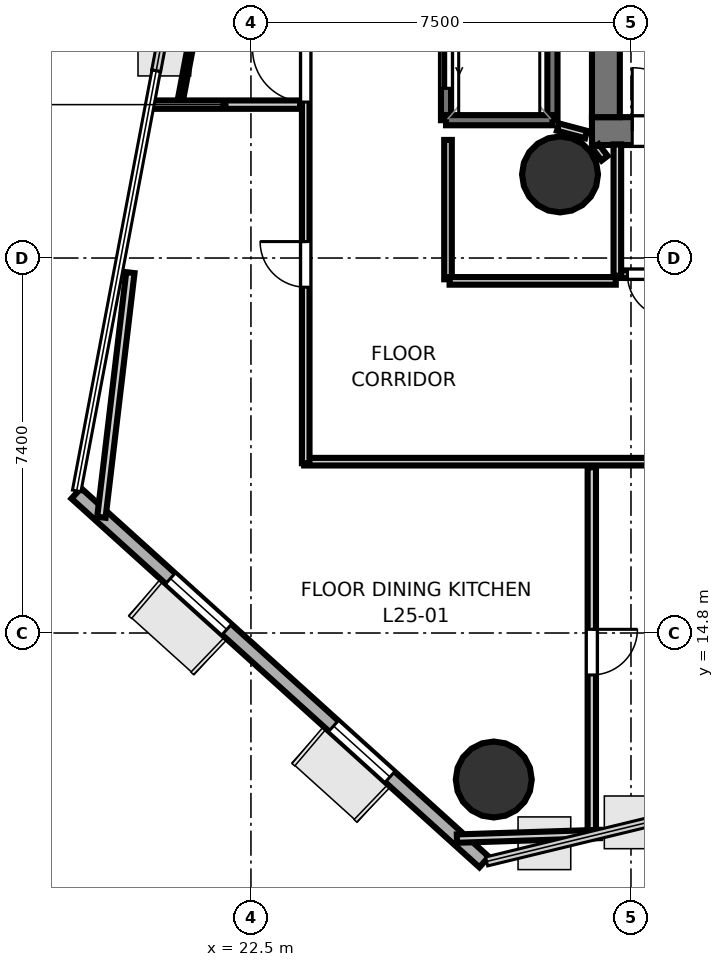
"""IFC4 building model, lengths in metres.
Left out: names, types, materials, properties, quantities, classifications, styles, units other than length and angle.
Written with IfcOpenShell. Run it as: python <this file> out.ifc"""

import sys

from ifc_helpers import new_model, si_unit, direction, frame, frame_2d, origin, origin_2d, place, context, subcontext, project, spatial, rectangle, hollow_circle, extrude, element, fill, save


model = new_model("IFC4")
c1 = context("Model", 3, precision=1e-05, world=origin(), true_north=direction((0.0, 1.0)))
c2 = subcontext(c1, "Body", "Model", "MODEL_VIEW")
j1 = project(units=[si_unit("LENGTHUNIT", "METRE"), si_unit("PLANEANGLEUNIT", "RADIAN")], contexts=[c1])
p1 = place(None, origin())
s1 = spatial("IfcSite", under=j1, at=p1, CompositionType="ELEMENT")
p2 = place(p1, origin())
s2 = spatial("IfcBuilding", under=s1, at=p2, CompositionType="ELEMENT")
p3 = place(p2, frame((0.0, 0.0, 101.5)))
s3 = spatial("IfcBuildingStorey", under=s2, at=p3, CompositionType="ELEMENT", Elevation=101.5)
p4 = place(p3, frame((29.23, 24.705, 0.0), z_axis=(0.0, 0.0, 1.0), x_axis=(1.0, 0.0, 0.0)))
e1 = element("IfcWall", 1, at=p4, inside=s3, PredefinedType="SHEAR", context=c2, shape_type="SweptSolid", body=[
    extrude(rectangle(XDim=10.62, YDim=0.55, at=frame_2d((5.31, 0.0))), origin(), (0.0, 0.0, 1.0), 3.52),
])
p5 = place(p4, frame((0.795, 0.0, 0.0)))
e2 = element("IfcOpeningElement", 2, at=p5, cuts=e1, PredefinedType="OPENING", context=c2, shape_type="SweptSolid", body=[
    extrude(rectangle(XDim=1.25, YDim=2.15, at=frame_2d((0.625, 1.075))), frame((0.0, 0.285, 0.0), z_axis=(0.0, -1.0, 0.0), x_axis=(1.0, 0.0, 0.0)), (0.0, 0.0, 1.0), 0.57),
])
p6 = place(p3, frame((29.505, 24.98, 0.0), z_axis=(0.0, 0.0, 1.0), x_axis=(0.0, 1.0, 0.0)))
e3 = element("IfcWall", 3, at=p6, inside=s3, PredefinedType="SHEAR", context=c2, shape_type="SweptSolid", body=[
    extrude(rectangle(XDim=7.44, YDim=0.55, at=frame_2d((3.72, 0.0))), origin(), (0.0, 0.0, 1.0), 3.52),
])
for number, where, z_axis, x_axis in (
    (4, (28.6, 23.85, 0.0), (0.0, 0.0, 1.0), (1.0, 0.0, 0.0)),
    (5, (27.292, 11.909, 0.0), (0.0, 0.0, 1.0), (1.0, 0.0, 0.0)),
):
    element("IfcColumn", number, at=place(p3, frame(where, z_axis=z_axis, x_axis=x_axis)), inside=s3, PredefinedType="COLUMN", context=c2, shape_type="SweptSolid", body=[
        extrude(hollow_circle(Radius=0.75, WallThickness=0.036, at=origin_2d()), origin(), (0.0, 0.0, 1.0), 3.7),
    ])
p7 = place(p3, frame((19.052, 17.556, 0.0), z_axis=(0.0, 0.0, 1.0), x_axis=(0.741888527343, -0.670523238223, 0.0)))
e6 = element("IfcWall", 6, at=p7, inside=s3, PredefinedType="SOLIDWALL", context=c2, shape_type="SweptSolid", body=[
    extrude(rectangle(XDim=10.851, YDim=0.28, at=frame_2d((5.426, 0.0))), origin(), (0.0, 0.0, 1.0), 3.52),
])
p8 = place(p7, frame((2.505, 0.0, 0.85)))
e7 = element("IfcOpeningElement", 7, at=p8, cuts=e6, PredefinedType="OPENING", context=c2, shape_type="SweptSolid", body=[
    extrude(rectangle(XDim=1.5, YDim=2.1, at=frame_2d((0.75, 1.05))), frame((0.0, 0.15, 0.0), z_axis=(0.0, -1.0, 0.0), x_axis=(1.0, 0.0, 0.0)), (0.0, 0.0, 1.0), 0.3),
])
p9 = place(p7, frame((6.846, 0.0, 0.85)))
e8 = element("IfcOpeningElement", 8, at=p9, cuts=e6, PredefinedType="OPENING", context=c2, shape_type="SweptSolid", body=[
    extrude(rectangle(XDim=1.5, YDim=2.1, at=frame_2d((0.75, 1.05))), frame((0.0, 0.15, 0.0), z_axis=(0.0, -1.0, 0.0), x_axis=(1.0, 0.0, 0.0)), (0.0, 0.0, 1.0), 0.3),
])
p10 = place(p3, frame((28.45, 24.92, 0.0), z_axis=(0.0, 0.0, 1.0), x_axis=(0.0, 1.0, 0.0)))
e9 = element("IfcWall", 9, at=p10, inside=s3, PredefinedType="SOLIDWALL", context=c2, shape_type="SweptSolid", body=[
    extrude(rectangle(XDim=2.36, YDim=0.2, at=frame_2d((1.18, 0.0))), origin(), (0.0, 0.0, 1.0), 3.52),
])
p11 = place(p3, frame((26.35, 24.92, 0.0), z_axis=(0.0, 0.0, 1.0), x_axis=(0.0, 1.0, 0.0)))
e10 = element("IfcWall", 10, at=p11, inside=s3, PredefinedType="SOLIDWALL", context=c2, shape_type="SweptSolid", body=[
    extrude(rectangle(XDim=2.36, YDim=0.2, at=frame_2d((1.18, 0.0))), origin(), (0.0, 0.0, 1.0), 3.52),
])
p12 = place(p11, frame((0.63, 0.0, 0.0)))
e11 = element("IfcOpeningElement", 11, at=p12, cuts=e10, PredefinedType="OPENING", context=c2, shape_type="SweptSolid", body=[
    extrude(rectangle(XDim=1.1, YDim=2.15, at=frame_2d((0.55, 1.075))), frame((0.0, 0.11, 0.0), z_axis=(0.0, -1.0, 0.0), x_axis=(1.0, 0.0, 0.0)), (0.0, 0.0, 1.0), 0.22),
])
p13 = place(p3, frame((26.35, 24.92, 0.0), z_axis=(0.0, 0.0, 1.0), x_axis=(1.0, 0.0, 0.0)))
e12 = element("IfcWall", 12, at=p13, inside=s3, PredefinedType="SOLIDWALL", context=c2, shape_type="SweptSolid", body=[
    extrude(rectangle(XDim=2.1, YDim=0.2, at=frame_2d((1.05, 0.0))), origin(), (0.0, 0.0, 1.0), 3.52),
])
p14 = place(p3, frame((33.45, 21.881, 0.0), z_axis=(0.0, 0.0, 1.0), x_axis=(-1.0, 0.0, 0.0)))
e13 = element("IfcWall", 13, at=p14, inside=s3, PredefinedType="PARTITIONING", context=c2, shape_type="SweptSolid", body=[
    extrude(rectangle(XDim=3.75, YDim=0.15, at=frame_2d((1.875, 0.0))), origin(), (0.0, 0.0, 1.0), 2.84),
])
p15 = place(p14, frame((1.275, 0.0, 0.0)))
e14 = element("IfcOpeningElement", 14, at=p15, cuts=e13, PredefinedType="OPENING", context=c2, shape_type="SweptSolid", body=[
    extrude(rectangle(XDim=1.2, YDim=2.15, at=frame_2d((0.6, 1.075))), frame((0.0, 0.085, 0.0), z_axis=(0.0, -1.0, 0.0), x_axis=(1.0, 0.0, 0.0)), (0.0, 0.0, 1.0), 0.17),
])
p16 = place(p14, frame((2.66, 0.0, 0.0)))
e15 = element("IfcOpeningElement", 15, at=p16, cuts=e13, PredefinedType="OPENING", context=c2, shape_type="SweptSolid", body=[
    extrude(rectangle(XDim=0.86, YDim=2.05, at=frame_2d((0.43, 1.025))), frame((0.0, 0.085, 0.0), z_axis=(0.0, -1.0, 0.0), x_axis=(1.0, 0.0, 0.0)), (0.0, 0.0, 1.0), 0.17),
])
p17 = place(p3, frame((29.731, 21.85, 0.0), z_axis=(0.0, 0.0, 1.0), x_axis=(0.0, 1.0, 0.0)))
e16 = element("IfcWall", 16, at=p17, inside=s3, PredefinedType="PARTITIONING", context=c2, shape_type="SweptSolid", body=[
    extrude(rectangle(XDim=2.592, YDim=0.15, at=frame_2d((1.296, 0.0))), origin(), (0.0, 0.0, 1.0), 2.84),
])
p18 = place(p3, frame((29.48, 24.169, 0.0), z_axis=(0.0, 0.0, 1.0), x_axis=(-0.608043045279, 0.79390405912, 0.0)))
e17 = element("IfcWall", 17, at=p18, inside=s3, PredefinedType="PARTITIONING", context=c2, shape_type="SweptSolid", body=[
    extrude(rectangle(XDim=0.29, YDim=0.15, at=frame_2d((0.145, 0.0))), origin(), (0.0, 0.0, 1.0), 2.84),
])
p19 = place(p3, frame((29.114, 24.637, 0.0), z_axis=(0.0, 0.0, 1.0), x_axis=(-0.966199685486, 0.257794817183, 0.0)))
e18 = element("IfcWall", 18, at=p19, inside=s3, PredefinedType="PARTITIONING", context=c2, shape_type="SweptSolid", body=[
    extrude(rectangle(XDim=0.575, YDim=0.15, at=frame_2d((0.288, 0.0))), origin(), (0.0, 0.0, 1.0), 2.84),
])
p20 = place(p3, frame((26.389, 24.531, 0.0), z_axis=(0.0, 0.0, 1.0), x_axis=(0.0, -1.0, 0.0)))
e19 = element("IfcWall", 19, at=p20, inside=s3, PredefinedType="PARTITIONING", context=c2, shape_type="SweptSolid", body=[
    extrude(rectangle(XDim=2.75, YDim=0.15, at=frame_2d((1.375, 0.0))), origin(), (0.0, 0.0, 1.0), 2.84),
])
p21 = place(p3, frame((26.42, 21.749, 0.0), z_axis=(0.0, 0.0, 1.0), x_axis=(1.0, 0.0, 0.0)))
e20 = element("IfcWall", 20, at=p21, inside=s3, PredefinedType="PARTITIONING", context=c2, shape_type="SweptSolid", body=[
    extrude(rectangle(XDim=3.28, YDim=0.15, at=frame_2d((1.64, 0.0))), origin(), (0.0, 0.0, 1.0), 2.84),
])
p22 = place(p3, frame((33.32, 18.181, 0.0), z_axis=(0.0, 0.0, 1.0), x_axis=(-1.0, 0.0, 0.0)))
e21 = element("IfcWall", 21, at=p22, inside=s3, PredefinedType="PARTITIONING", context=c2, shape_type="SweptSolid", body=[
    extrude(rectangle(XDim=9.77, YDim=0.15, at=frame_2d((4.885, 0.0))), origin(), (0.0, 0.0, 1.0), 2.84),
])
p23 = place(p3, frame((23.581, 18.15, 0.0), z_axis=(0.0, 0.0, 1.0), x_axis=(0.0, 1.0, 0.0)))
e22 = element("IfcWall", 22, at=p23, inside=s3, PredefinedType="PARTITIONING", context=c2, shape_type="SweptSolid", body=[
    extrude(rectangle(XDim=8.575, YDim=0.15, at=frame_2d((4.288, 0.0))), origin(), (0.0, 0.0, 1.0), 2.84),
])
p24 = place(p23, frame((3.474, 0.0, 0.0)))
e23 = element("IfcOpeningElement", 23, at=p24, cuts=e22, PredefinedType="OPENING", context=c2, shape_type="SweptSolid", body=[
    extrude(rectangle(XDim=0.9, YDim=2.1, at=frame_2d((0.45, 1.05))), frame((0.0, 0.085, 0.0), z_axis=(0.0, -1.0, 0.0), x_axis=(1.0, 0.0, 0.0)), (0.0, 0.0, 1.0), 0.17),
])
p25 = place(p23, frame((7.128, 0.0, 0.0)))
e24 = element("IfcOpeningElement", 24, at=p25, cuts=e22, PredefinedType="OPENING", context=c2, shape_type="SweptSolid", body=[
    extrude(rectangle(XDim=1.05, YDim=2.15, at=frame_2d((0.525, 1.075))), frame((0.0, 0.085, 0.0), z_axis=(0.0, -1.0, 0.0), x_axis=(1.0, 0.0, 0.0)), (0.0, 0.0, 1.0), 0.17),
])
p26 = place(p3, frame((20.484, 25.227, 0.0), z_axis=(0.0, 0.0, 1.0), x_axis=(1.0, 0.0, 0.0)))
e25 = element("IfcWall", 25, at=p26, inside=s3, PredefinedType="PLUMBINGWALL", context=c2, shape_type="SweptSolid", body=[
    extrude(rectangle(XDim=2.986, YDim=0.165, at=frame_2d((1.493, 0.0))), origin(), (0.0, 0.0, 1.0), 2.84),
])
p27 = place(p3, frame((29.227, 18.07, 0.0), z_axis=(0.0, 0.0, 1.0), x_axis=(0.0, -1.0, 0.0)))
e26 = element("IfcWall", 26, at=p27, inside=s3, PredefinedType="PLUMBINGWALL", context=c2, shape_type="SweptSolid", body=[
    extrude(rectangle(XDim=7.295, YDim=0.165, at=frame_2d((3.647, 0.0))), origin(), (0.0, 0.0, 1.0), 2.84),
])
p28 = place(p27, frame((3.198, 0.0, 0.0)))
e27 = element("IfcOpeningElement", 27, at=p28, cuts=e26, PredefinedType="OPENING", context=c2, shape_type="SweptSolid", body=[
    extrude(rectangle(XDim=0.9, YDim=2.1, at=frame_2d((0.45, 1.05))), frame((0.0, 0.093, 0.0), z_axis=(0.0, -1.0, 0.0), x_axis=(1.0, 0.0, 0.0)), (0.0, 0.0, 1.0), 0.185),
])
p29 = place(p3, frame((29.386, 10.834, 0.0), z_axis=(0.0, 0.0, 1.0), x_axis=(-0.999476511247, -0.032352796885, 0.0)))
e28 = element("IfcWall", 28, at=p29, inside=s3, PredefinedType="PLUMBINGWALL", context=c2, shape_type="SweptSolid", body=[
    extrude(rectangle(XDim=2.822, YDim=0.165, at=frame_2d((1.411, 0.0))), origin(), (0.0, 0.0, 1.0), 2.84),
])
p30 = place(p3, frame((19.548, 17.084, 0.0), z_axis=(0.0, 0.0, 1.0), x_axis=(0.117654076747, 0.9930546401, 0.0)))
e29 = element("IfcWall", 29, at=p30, inside=s3, PredefinedType="PLUMBINGWALL", context=c2, shape_type="SweptSolid", body=[
    extrude(rectangle(XDim=4.862, YDim=0.165, at=frame_2d((2.431, 0.0))), origin(), (0.0, 0.0, 1.0), 2.84),
])
p31 = place(p3, frame((21.111, 25.336, 0.0), z_axis=(0.0, 0.0, 1.0), x_axis=(0.186002357958, 0.982549297915, 0.0)))
e30 = element("IfcWall", 30, at=p31, inside=s3, PredefinedType="PARTITIONING", context=c2, shape_type="SweptSolid", body=[
    extrude(rectangle(XDim=6.733, YDim=0.105, at=frame_2d((3.367, 0.0))), origin(), (0.0, 0.0, 1.0), 2.84),
])
p32 = place(p5, origin())
e31 = element("IfcDoor", 31, at=p32, inside=s3, OperationType="SINGLE_SWING_LEFT", PredefinedType="DOOR", context=c2, shape_type="SweptSolid", body=[
    extrude(rectangle(XDim=1.25, YDim=2.15, at=frame_2d((0.625, 1.075))), frame((0.0, 0.025, 0.0), z_axis=(0.0, -1.0, 0.0), x_axis=(1.0, 0.0, 0.0)), (0.0, 0.0, 1.0), 0.05),
])
fill(e2, e31)
p33 = place(p12, origin())
e32 = element("IfcDoor", 32, at=p33, inside=s3, OperationType="SLIDING_TO_LEFT", PredefinedType="DOOR", context=c2, shape_type="SweptSolid", body=[
    extrude(rectangle(XDim=1.1, YDim=2.15, at=frame_2d((0.55, 1.075))), frame((0.0, 0.025, 0.0), z_axis=(0.0, -1.0, 0.0), x_axis=(1.0, 0.0, 0.0)), (0.0, 0.0, 1.0), 0.05),
])
fill(e11, e32)
p34 = place(p16, origin())
e33 = element("IfcDoor", 33, at=p34, inside=s3, OperationType="SINGLE_SWING_LEFT", PredefinedType="DOOR", context=c2, shape_type="SweptSolid", body=[
    extrude(rectangle(XDim=0.86, YDim=2.05, at=frame_2d((0.43, 1.025))), frame((0.0, 0.025, 0.0), z_axis=(0.0, -1.0, 0.0), x_axis=(1.0, 0.0, 0.0)), (0.0, 0.0, 1.0), 0.05),
])
fill(e15, e33)
p35 = place(p24, origin())
e34 = element("IfcDoor", 34, at=p35, inside=s3, OperationType="SINGLE_SWING_RIGHT", PredefinedType="DOOR", context=c2, shape_type="SweptSolid", body=[
    extrude(rectangle(XDim=0.9, YDim=2.1, at=frame_2d((0.45, 1.05))), frame((0.0, 0.025, 0.0), z_axis=(0.0, -1.0, 0.0), x_axis=(1.0, 0.0, 0.0)), (0.0, 0.0, 1.0), 0.05),
])
fill(e23, e34)
p36 = place(p25, origin())
e35 = element("IfcDoor", 35, at=p36, inside=s3, OperationType="SINGLE_SWING_RIGHT", PredefinedType="DOOR", context=c2, shape_type="SweptSolid", body=[
    extrude(rectangle(XDim=1.05, YDim=2.15, at=frame_2d((0.525, 1.075))), frame((0.0, 0.025, 0.0), z_axis=(0.0, -1.0, 0.0), x_axis=(1.0, 0.0, 0.0)), (0.0, 0.0, 1.0), 0.05),
])
fill(e24, e35)
p37 = place(p28, origin())
e36 = element("IfcDoor", 36, at=p37, inside=s3, OperationType="SINGLE_SWING_LEFT", PredefinedType="DOOR", context=c2, shape_type="SweptSolid", body=[
    extrude(rectangle(XDim=0.9, YDim=2.1, at=frame_2d((0.45, 1.05))), frame((0.0, 0.025, 0.0), z_axis=(0.0, -1.0, 0.0), x_axis=(1.0, 0.0, 0.0)), (0.0, 0.0, 1.0), 0.05),
])
fill(e27, e36)
p38 = place(p8, origin())
e37 = element("IfcWindow", 37, at=p38, inside=s3, PartitioningType="SINGLE_PANEL", PredefinedType="WINDOW", context=c2, shape_type="SweptSolid", body=[
    extrude(rectangle(XDim=1.5, YDim=2.1, at=frame_2d((0.75, 1.05))), frame((0.0, 0.03, 0.0), z_axis=(0.0, -1.0, 0.0), x_axis=(1.0, 0.0, 0.0)), (0.0, 0.0, 1.0), 0.06),
])
fill(e7, e37)
p39 = place(p9, origin())
e38 = element("IfcWindow", 38, at=p39, inside=s3, PartitioningType="SINGLE_PANEL", PredefinedType="WINDOW", context=c2, shape_type="SweptSolid", body=[
    extrude(rectangle(XDim=1.5, YDim=2.1, at=frame_2d((0.75, 1.05))), frame((0.0, 0.03, 0.0), z_axis=(0.0, -1.0, 0.0), x_axis=(1.0, 0.0, 0.0)), (0.0, 0.0, 1.0), 0.06),
])
fill(e8, e38)
save(model, sys.argv[1])
